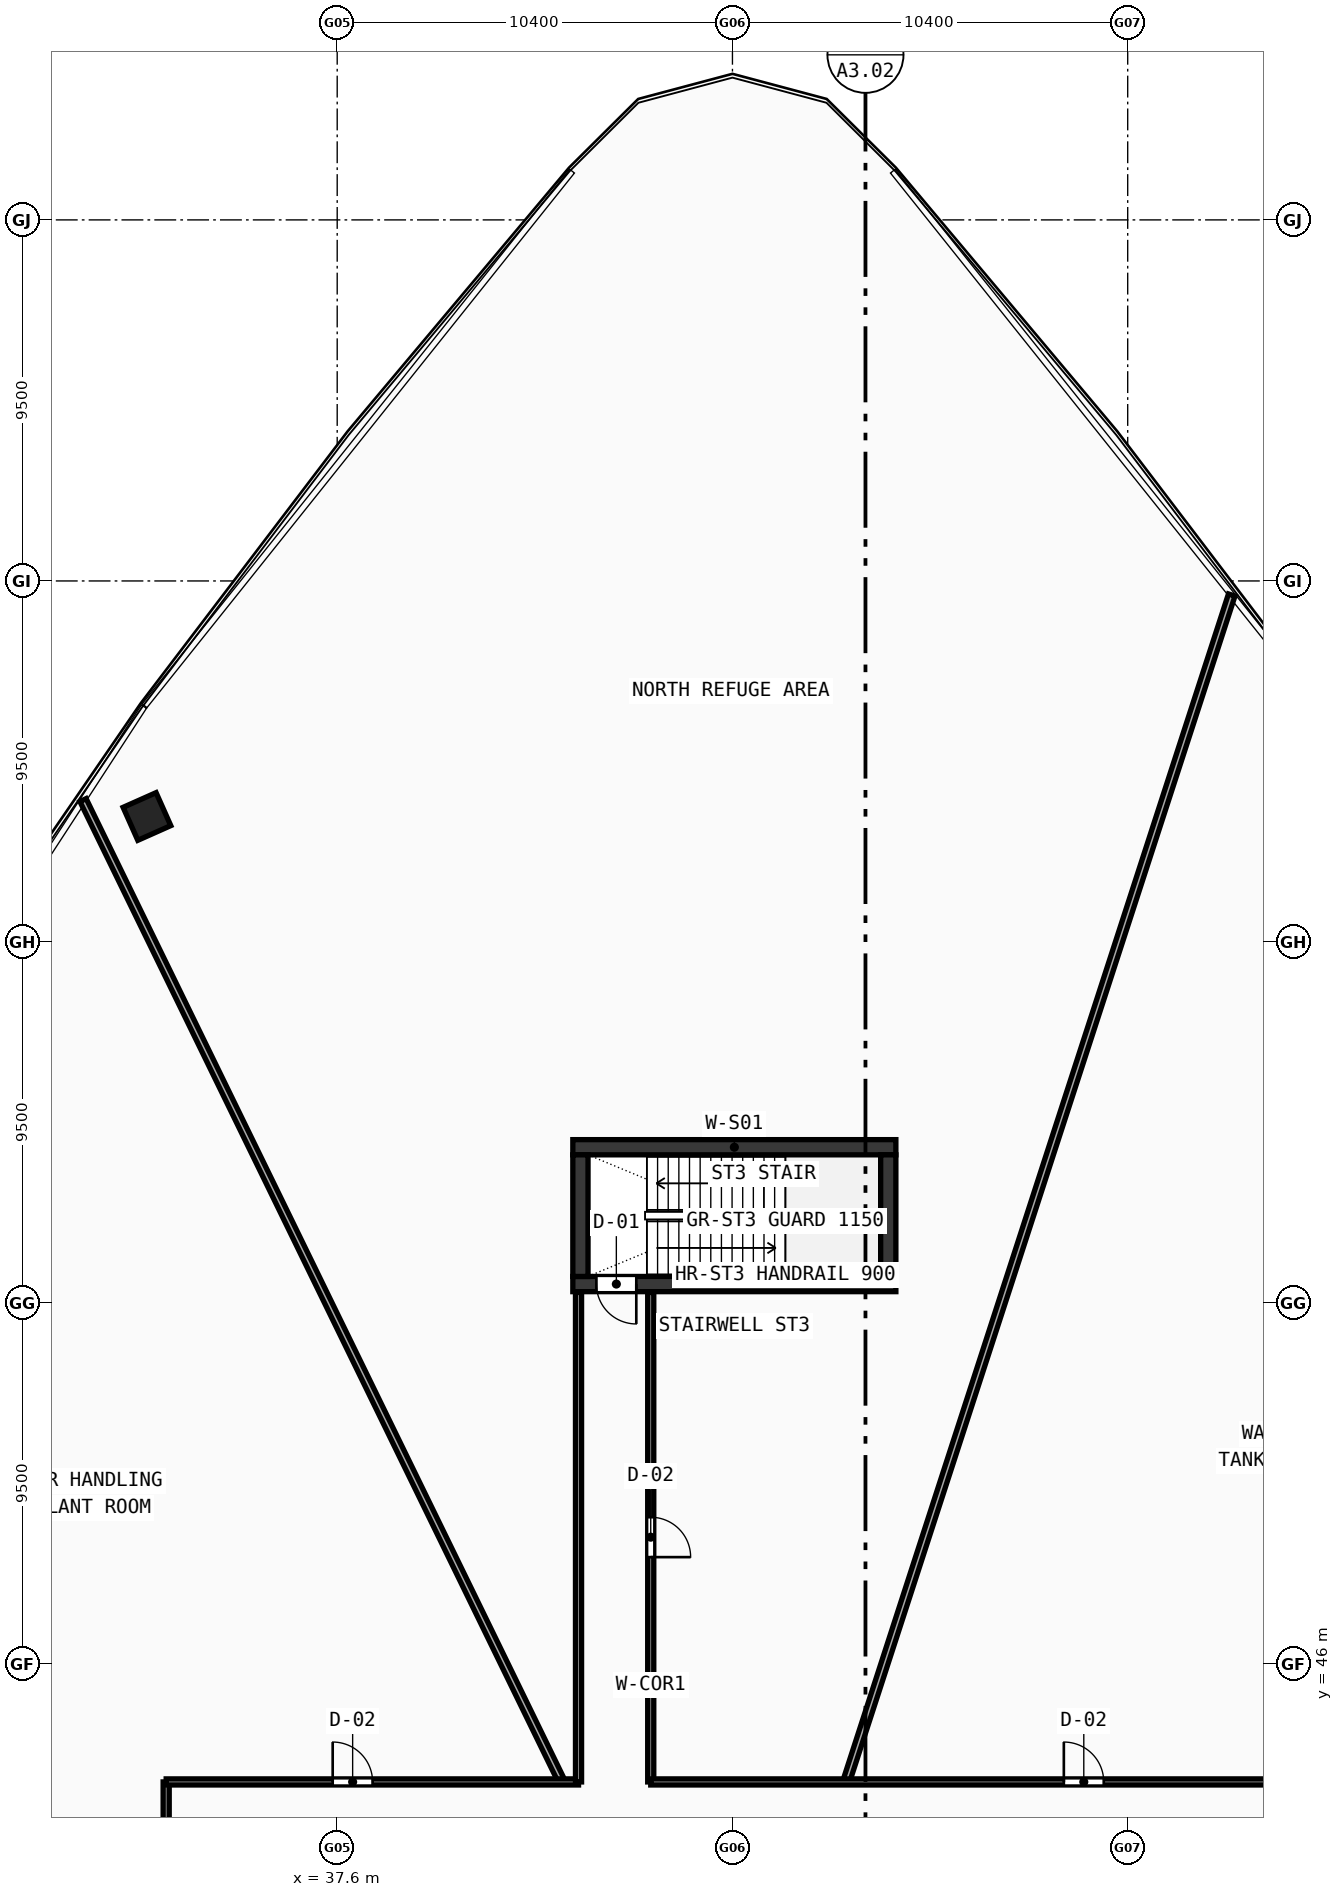
"""IFC4 building model, lengths in metres.
Left out: names, types, materials, properties, quantities, classifications, styles, units other than length and angle.
Written with IfcOpenShell. Run it as: python <this file> out.ifc"""

import sys

from ifc_helpers import new_model, si_unit, direction, frame, frame_2d, origin, origin_with_axes, origin_2d, place, context, subcontext, project, spatial, rectangle, hollow_rectangle, extrude, source, transform, mapped, element, fill, save


model = new_model("IFC4")
c1 = context("Model", 3, precision=1e-05, world=origin(), true_north=direction((0.0, 1.0)))
c2 = subcontext(c1, "Body", "Model", "MODEL_VIEW")
j1 = project(units=[si_unit("LENGTHUNIT", "METRE"), si_unit("PLANEANGLEUNIT", "RADIAN")], contexts=[c1])
p1 = place(None, origin())
s1 = spatial("IfcSite", under=j1, at=p1, CompositionType="ELEMENT")
p2 = place(p1, origin())
s2 = spatial("IfcBuilding", under=s1, at=p2, CompositionType="ELEMENT")
p3 = place(p2, frame((0.0, 0.0, 125.03)))
s3 = spatial("IfcBuildingStorey", under=s2, at=p3, CompositionType="ELEMENT", Elevation=125.03)
p4 = place(p3, frame((43.8, 59.6, 0.0), z_axis=(0.0, 0.0, 1.0), x_axis=(1.0, 0.0, 0.0)))
e1 = element("IfcWall", 1, at=p4, inside=s3, PredefinedType="SHEAR", context=c2, shape_type="SweptSolid", body=[
    extrude(rectangle(XDim=8.5, YDim=0.4, at=frame_2d((4.25, 0.0))), origin(), (0.0, 0.0, 1.0), 4.54),
])
p5 = place(p3, frame((43.8, 56.0, 0.0), z_axis=(0.0, 0.0, 1.0), x_axis=(1.0, 0.0, 0.0)))
e2 = element("IfcWall", 2, at=p5, inside=s3, PredefinedType="SHEAR", context=c2, shape_type="SweptSolid", body=[
    extrude(rectangle(XDim=8.5, YDim=0.4, at=frame_2d((4.25, 0.0))), origin(), (0.0, 0.0, 1.0), 4.54),
])
p6 = place(p5, frame((0.62, 0.0, 0.0)))
e3 = element("IfcOpeningElement", 3, at=p6, cuts=e2, PredefinedType="OPENING", context=c2, shape_type="SweptSolid", body=[
    extrude(rectangle(XDim=1.05, YDim=2.1, at=frame_2d((0.525, 1.05))), frame((0.0, 0.21, 0.0), z_axis=(0.0, -1.0, 0.0), x_axis=(1.0, 0.0, 0.0)), (0.0, 0.0, 1.0), 0.42),
])
for number, where, z_axis, x_axis in (
    (4, (44.0, 56.2, 0.0), (0.0, 0.0, 1.0), (0.0, 1.0, 0.0)),
    (5, (52.1, 56.2, 0.0), (0.0, 0.0, 1.0), (0.0, 1.0, 0.0)),
):
    element("IfcWall", number, at=place(p3, frame(where, z_axis=z_axis, x_axis=x_axis)), inside=s3, PredefinedType="SHEAR", context=c2, shape_type="SweptSolid", body=[
        extrude(rectangle(XDim=3.2, YDim=0.4, at=frame_2d((1.6, 0.0))), origin(), (0.0, 0.0, 1.0), 4.54),
    ])
m1 = source(origin(), c2, "Body", "SweptSolid", [
    extrude(hollow_rectangle(XDim=0.95, YDim=0.95, WallThickness=0.04, at=origin_2d()), origin(), (0.0, 0.0, 1.0), 4.82),
])
p7 = place(p3, frame((32.594, 68.303, -0.28), z_axis=(0.0, 0.0, 1.0), x_axis=(-0.913545457643, -0.406736643076, 0.0)))
e6 = element("IfcColumn", 6, at=p7, inside=s3, PredefinedType="COLUMN", context=c2, shape_type="MappedRepresentation", body=[
    mapped(m1, transform((0.0, 0.0, 0.0), scale=1.0)),
])
p8 = place(p3, frame((50.989, 42.9, 0.0), z_axis=(0.0, 0.0, 1.0), x_axis=(0.309014626383, 0.951057285699, 0.0)))
e7 = element("IfcWall", 7, at=p8, inside=s3, PredefinedType="PARTITIONING", context=c2, shape_type="SweptSolid", body=[
    extrude(rectangle(XDim=32.839, YDim=0.18, at=frame_2d((16.419, 0.0))), origin(), (0.0, 0.0, 1.0), 3.89),
])
p9 = place(p3, frame((43.513, 42.9, 0.0), z_axis=(0.0, 0.0, 1.0), x_axis=(-0.438371753417, 0.898793750427, 0.0)))
e8 = element("IfcWall", 8, at=p9, inside=s3, PredefinedType="PARTITIONING", context=c2, shape_type="SweptSolid", body=[
    extrude(rectangle(XDim=28.743, YDim=0.18, at=frame_2d((14.372, 0.0))), origin(), (0.0, 0.0, 1.0), 3.89),
])
p10 = place(p3, frame((45.85, 55.78, 0.0), z_axis=(0.0, 0.0, 1.0), x_axis=(0.0, -1.0, 0.0)))
e9 = element("IfcWall", 9, at=p10, inside=s3, PredefinedType="PARTITIONING", context=c2, shape_type="SweptSolid", body=[
    extrude(rectangle(XDim=12.88, YDim=0.16, at=frame_2d((6.44, 0.0))), origin(), (0.0, 0.0, 1.0), 4.14),
])
p11 = place(p10, frame((5.915, 0.0, 0.0)))
e10 = element("IfcOpeningElement", 10, at=p11, cuts=e9, PredefinedType="OPENING", context=c2, shape_type="SweptSolid", body=[
    extrude(rectangle(XDim=1.05, YDim=2.1, at=frame_2d((0.525, 1.05))), frame((0.0, 0.09, 0.0), z_axis=(0.0, -1.0, 0.0), x_axis=(1.0, 0.0, 0.0)), (0.0, 0.0, 1.0), 0.18),
])
p12 = place(p3, frame((45.85, 42.9, 0.0), z_axis=(0.0, 0.0, 1.0), x_axis=(1.0, 0.0, 0.0)))
e11 = element("IfcWall", 11, at=p12, inside=s3, PredefinedType="PARTITIONING", context=c2, shape_type="SweptSolid", body=[
    extrude(rectangle(XDim=17.05, YDim=0.16, at=frame_2d((8.525, 0.0))), origin(), (0.0, 0.0, 1.0), 3.89),
])
p13 = place(p12, frame((10.87, 0.0, 0.0)))
e12 = element("IfcOpeningElement", 12, at=p13, cuts=e11, PredefinedType="OPENING", context=c2, shape_type="SweptSolid", body=[
    extrude(rectangle(XDim=1.05, YDim=2.1, at=frame_2d((0.525, 1.05))), frame((0.0, 0.09, 0.0), z_axis=(0.0, -1.0, 0.0), x_axis=(1.0, 0.0, 0.0)), (0.0, 0.0, 1.0), 0.18),
])
p14 = place(p3, frame((33.1, 24.9, 0.0), z_axis=(0.0, 0.0, 1.0), x_axis=(0.0, 1.0, 0.0)))
e13 = element("IfcWall", 13, at=p14, inside=s3, PredefinedType="PARTITIONING", context=c2, shape_type="SweptSolid", body=[
    extrude(rectangle(XDim=18.0, YDim=0.16, at=frame_2d((9.0, 0.0))), origin(), (0.0, 0.0, 1.0), 3.89),
])
p15 = place(p14, frame((4.622, 0.0, 0.0)))
e14 = element("IfcOpeningElement", 14, at=p15, cuts=e13, PredefinedType="OPENING", context=c2, shape_type="SweptSolid", body=[
    extrude(rectangle(XDim=1.05, YDim=2.1, at=frame_2d((0.525, 1.05))), frame((0.0, 0.09, 0.0), z_axis=(0.0, -1.0, 0.0), x_axis=(1.0, 0.0, 0.0)), (0.0, 0.0, 1.0), 0.18),
])
p16 = place(p3, frame((33.1, 42.9, 0.0), z_axis=(0.0, 0.0, 1.0), x_axis=(1.0, 0.0, 0.0)))
e15 = element("IfcWall", 15, at=p16, inside=s3, PredefinedType="PARTITIONING", context=c2, shape_type="SweptSolid", body=[
    extrude(rectangle(XDim=10.85, YDim=0.16, at=frame_2d((5.425, 0.0))), origin(), (0.0, 0.0, 1.0), 3.89),
])
p17 = place(p16, frame((4.381, 0.0, 0.0)))
e16 = element("IfcOpeningElement", 16, at=p17, cuts=e15, PredefinedType="OPENING", context=c2, shape_type="SweptSolid", body=[
    extrude(rectangle(XDim=1.05, YDim=2.1, at=frame_2d((0.525, 1.05))), frame((0.0, 0.09, 0.0), z_axis=(0.0, -1.0, 0.0), x_axis=(1.0, 0.0, 0.0)), (0.0, 0.0, 1.0), 0.18),
])
p18 = place(p3, frame((43.95, 42.9, 0.0), z_axis=(0.0, 0.0, 1.0), x_axis=(0.0, 1.0, 0.0)))
e17 = element("IfcWall", 17, at=p18, inside=s3, PredefinedType="PARTITIONING", context=c2, shape_type="SweptSolid", body=[
    extrude(rectangle(XDim=12.88, YDim=0.16, at=frame_2d((6.44, 0.0))), origin(), (0.0, 0.0, 1.0), 3.89),
])
m2 = source(origin(), c2, "Body", "SweptSolid", [
    extrude(rectangle(XDim=1.05, YDim=2.1, at=frame_2d((0.525, 1.05))), frame((0.0, 0.025, 0.0), z_axis=(0.0, -1.0, 0.0), x_axis=(1.0, 0.0, 0.0)), (0.0, 0.0, 1.0), 0.05),
])
p19 = place(p6, frame((1.05, 0.0, 0.0), z_axis=(0.0, 0.0, 1.0), x_axis=(-1.0, 0.0, 0.0)))
e18 = element("IfcDoor", 18, at=p19, inside=s3, OperationType="SINGLE_SWING_LEFT", PredefinedType="DOOR", context=c2, shape_type="MappedRepresentation", body=[
    mapped(m2, transform((0.0, 0.0, 0.0), scale=1.0)),
])
fill(e3, e18)
p20 = place(p13, origin_with_axes())
e19 = element("IfcDoor", 19, at=p20, inside=s3, OperationType="SINGLE_SWING_LEFT", PredefinedType="DOOR", context=c2, shape_type="MappedRepresentation", body=[
    mapped(m2, transform((0.0, 0.0, 0.0), scale=1.0)),
])
fill(e12, e19)
p21 = place(p11, origin_with_axes())
e20 = element("IfcDoor", 20, at=p21, inside=s3, OperationType="SINGLE_SWING_RIGHT", PredefinedType="DOOR", context=c2, shape_type="MappedRepresentation", body=[
    mapped(m2, transform((0.0, 0.0, 0.0), scale=1.0)),
])
fill(e10, e20)
p22 = place(p17, origin_with_axes())
e21 = element("IfcDoor", 21, at=p22, inside=s3, OperationType="SINGLE_SWING_LEFT", PredefinedType="DOOR", context=c2, shape_type="MappedRepresentation", body=[
    mapped(m2, transform((0.0, 0.0, 0.0), scale=1.0)),
])
fill(e16, e21)
save(model, sys.argv[1])
